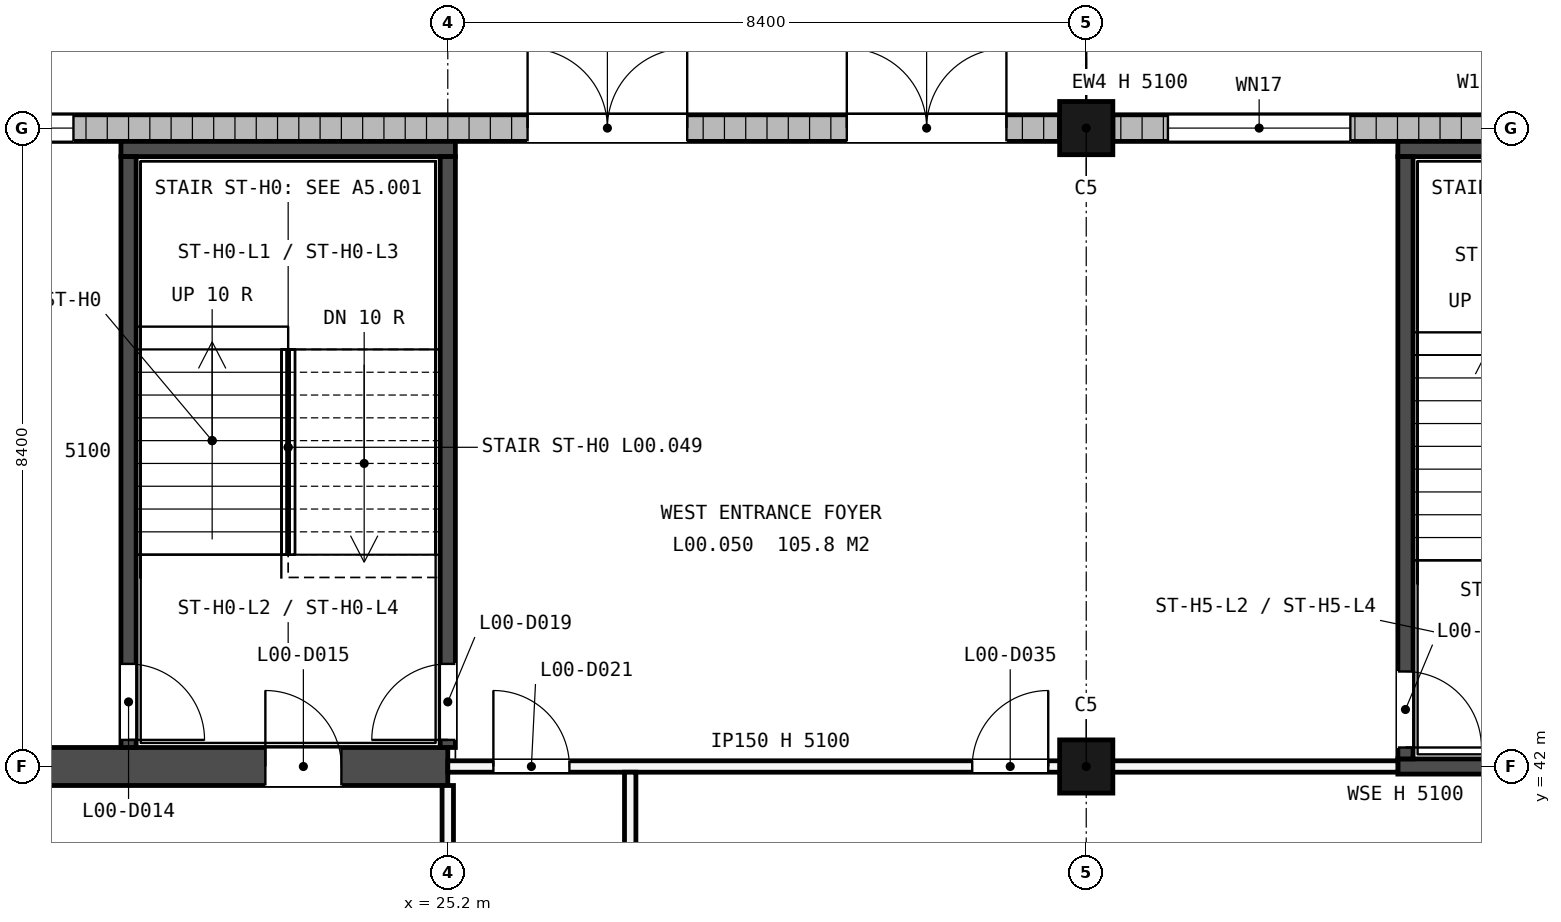
"""IFC4 building model, lengths in metres.
Left out: names, types, materials, properties, quantities, classifications, styles, units other than length and angle.
Written with IfcOpenShell. Run it as: python <this file> out.ifc"""

import sys

from ifc_helpers import new_model, si_unit, direction, frame, frame_2d, origin, origin_2d, place, context, subcontext, project, spatial, rectangle, extrude, element, fill, save


model = new_model("IFC4")
c1 = context("Model", 3, precision=1e-05, world=origin(), true_north=direction((0.0, 1.0)))
c2 = subcontext(c1, "Body", "Model", "MODEL_VIEW")
j1 = project(units=[si_unit("LENGTHUNIT", "METRE"), si_unit("PLANEANGLEUNIT", "RADIAN")], contexts=[c1])
p1 = place(None, origin())
s1 = spatial("IfcSite", under=j1, at=p1, CompositionType="ELEMENT")
p2 = place(p1, origin())
s2 = spatial("IfcBuilding", under=s1, at=p2, CompositionType="ELEMENT")
p3 = place(p2, origin())
s3 = spatial("IfcBuildingStorey", under=s2, at=p3, CompositionType="ELEMENT", Elevation=0.0)
for number, where, z_axis, x_axis in (
    (1, (33.6, 42.0, -0.3), (0.0, 0.0, 1.0), (1.0, 0.0, 0.0)),
    (2, (33.6, 50.4, -0.3), (0.0, 0.0, 1.0), (1.0, 0.0, 0.0)),
):
    element("IfcColumn", number, at=place(p3, frame(where, z_axis=z_axis, x_axis=x_axis)), inside=s3, PredefinedType="COLUMN", context=c2, shape_type="SweptSolid", body=[
        extrude(rectangle(XDim=0.7, YDim=0.7, at=origin_2d()), origin(), (0.0, 0.0, 1.0), 5.4),
    ])
p4 = place(p3, frame((0.0, 42.0, -0.3), z_axis=(0.0, 0.0, 1.0), x_axis=(1.0, 0.0, 0.0)))
e3 = element("IfcWall", 3, at=p4, inside=s3, PredefinedType="SHEAR", context=c2, shape_type="SweptSolid", body=[
    extrude(rectangle(XDim=25.2, YDim=0.5, at=frame_2d((12.6, 0.0))), origin(), (0.0, 0.0, 1.0), 5.4),
])
p5 = place(p4, frame((9.8, 0.0, 0.3)))
e4 = element("IfcOpeningElement", 4, at=p5, cuts=e3, PredefinedType="OPENING", context=c2, shape_type="SweptSolid", body=[
    extrude(rectangle(XDim=1.0, YDim=2.1, at=frame_2d((0.5, 1.05))), frame((0.0, 0.26, 0.0), z_axis=(0.0, -1.0, 0.0), x_axis=(1.0, 0.0, 0.0)), (0.0, 0.0, 1.0), 0.52),
])
p6 = place(p4, frame((22.8, 0.0, 0.3)))
e5 = element("IfcOpeningElement", 5, at=p6, cuts=e3, PredefinedType="OPENING", context=c2, shape_type="SweptSolid", body=[
    extrude(rectangle(XDim=1.0, YDim=2.1, at=frame_2d((0.5, 1.05))), frame((0.0, 0.26, 0.0), z_axis=(0.0, -1.0, 0.0), x_axis=(1.0, 0.0, 0.0)), (0.0, 0.0, 1.0), 0.52),
])
p7 = place(p3, frame((17.15, 50.4, 0.0), z_axis=(0.0, 0.0, 1.0), x_axis=(1.0, 0.0, 0.0)))
e6 = element("IfcWall", 6, at=p7, inside=s3, PredefinedType="STANDARD", context=c2, shape_type="SweptSolid", body=[
    extrude(rectangle(XDim=16.1, YDim=0.35, at=frame_2d((8.05, 0.0))), origin(), (0.0, 0.0, 1.0), 5.1),
])
p8 = place(p7, frame((9.1, 0.0, 0.0)))
e7 = element("IfcOpeningElement", 7, at=p8, cuts=e6, PredefinedType="OPENING", context=c2, shape_type="SweptSolid", body=[
    extrude(rectangle(XDim=2.1, YDim=2.2, at=frame_2d((1.05, 1.1))), frame((0.0, 0.185, 0.0), z_axis=(0.0, -1.0, 0.0), x_axis=(1.0, 0.0, 0.0)), (0.0, 0.0, 1.0), 0.37),
])
p9 = place(p7, frame((13.3, 0.0, 0.0)))
e8 = element("IfcOpeningElement", 8, at=p9, cuts=e6, PredefinedType="OPENING", context=c2, shape_type="SweptSolid", body=[
    extrude(rectangle(XDim=2.1, YDim=2.2, at=frame_2d((1.05, 1.1))), frame((0.0, 0.185, 0.0), z_axis=(0.0, -1.0, 0.0), x_axis=(1.0, 0.0, 0.0)), (0.0, 0.0, 1.0), 0.37),
])
p10 = place(p7, frame((0.725, 0.0, 0.9)))
e9 = element("IfcOpeningElement", 9, at=p10, cuts=e6, PredefinedType="OPENING", context=c2, shape_type="SweptSolid", body=[
    extrude(rectangle(XDim=2.4, YDim=1.5, at=frame_2d((1.2, 0.75))), frame((0.0, 0.185, 0.0), z_axis=(0.0, -1.0, 0.0), x_axis=(1.0, 0.0, 0.0)), (0.0, 0.0, 1.0), 0.37),
])
p11 = place(p3, frame((33.95, 50.4, 0.0), z_axis=(0.0, 0.0, 1.0), x_axis=(1.0, 0.0, 0.0)))
e10 = element("IfcWall", 10, at=p11, inside=s3, PredefinedType="STANDARD", context=c2, shape_type="SweptSolid", body=[
    extrude(rectangle(XDim=8.05, YDim=0.35, at=frame_2d((4.025, 0.0))), origin(), (0.0, 0.0, 1.0), 5.1),
])
p12 = place(p11, frame((0.725, 0.0, 0.9)))
e11 = element("IfcOpeningElement", 11, at=p12, cuts=e10, PredefinedType="OPENING", context=c2, shape_type="SweptSolid", body=[
    extrude(rectangle(XDim=2.4, YDim=1.5, at=frame_2d((1.2, 0.75))), frame((0.0, 0.185, 0.0), z_axis=(0.0, -1.0, 0.0), x_axis=(1.0, 0.0, 0.0)), (0.0, 0.0, 1.0), 0.37),
])
p13 = place(p3, frame((20.9, 50.125, 0.0), z_axis=(0.0, 0.0, 1.0), x_axis=(1.0, 0.0, 0.0)))
e12 = element("IfcWall", 12, at=p13, inside=s3, PredefinedType="SHEAR", context=c2, shape_type="SweptSolid", body=[
    extrude(rectangle(XDim=4.4, YDim=0.2, at=frame_2d((2.2, 0.0))), origin(), (0.0, 0.0, 1.0), 5.1),
])
p14 = place(p3, frame((21.0, 42.25, 0.0), z_axis=(0.0, 0.0, 1.0), x_axis=(0.0, 1.0, 0.0)))
e13 = element("IfcWall", 13, at=p14, inside=s3, PredefinedType="SHEAR", context=c2, shape_type="SweptSolid", body=[
    extrude(rectangle(XDim=7.775, YDim=0.2, at=frame_2d((3.887, 0.0))), origin(), (0.0, 0.0, 1.0), 5.1),
])
p15 = place(p14, frame((0.1, 0.0, 0.0)))
e14 = element("IfcOpeningElement", 14, at=p15, cuts=e13, PredefinedType="OPENING", context=c2, shape_type="SweptSolid", body=[
    extrude(rectangle(XDim=1.0, YDim=2.1, at=frame_2d((0.5, 1.05))), frame((0.0, 0.11, 0.0), z_axis=(0.0, -1.0, 0.0), x_axis=(1.0, 0.0, 0.0)), (0.0, 0.0, 1.0), 0.22),
])
p16 = place(p3, frame((25.2, 42.25, 0.0), z_axis=(0.0, 0.0, 1.0), x_axis=(0.0, 1.0, 0.0)))
e15 = element("IfcWall", 15, at=p16, inside=s3, PredefinedType="SHEAR", context=c2, shape_type="SweptSolid", body=[
    extrude(rectangle(XDim=7.775, YDim=0.2, at=frame_2d((3.887, 0.0))), origin(), (0.0, 0.0, 1.0), 5.1),
])
p17 = place(p16, frame((0.1, 0.0, 0.0)))
e16 = element("IfcOpeningElement", 16, at=p17, cuts=e15, PredefinedType="OPENING", context=c2, shape_type="SweptSolid", body=[
    extrude(rectangle(XDim=1.0, YDim=2.1, at=frame_2d((0.5, 1.05))), frame((0.0, 0.11, 0.0), z_axis=(0.0, -1.0, 0.0), x_axis=(1.0, 0.0, 0.0)), (0.0, 0.0, 1.0), 0.22),
])
p18 = place(p3, frame((37.7, 42.0, 0.0), z_axis=(0.0, 0.0, 1.0), x_axis=(1.0, 0.0, 0.0)))
e17 = element("IfcWall", 17, at=p18, inside=s3, PredefinedType="SHEAR", context=c2, shape_type="SweptSolid", body=[
    extrude(rectangle(XDim=4.4, YDim=0.2, at=frame_2d((2.2, 0.0))), origin(), (0.0, 0.0, 1.0), 5.1),
])
p19 = place(p18, frame((1.5, 0.0, 0.0)))
e18 = element("IfcOpeningElement", 18, at=p19, cuts=e17, PredefinedType="OPENING", context=c2, shape_type="SweptSolid", body=[
    extrude(rectangle(XDim=1.0, YDim=2.1, at=frame_2d((0.5, 1.05))), frame((0.0, 0.11, 0.0), z_axis=(0.0, -1.0, 0.0), x_axis=(1.0, 0.0, 0.0)), (0.0, 0.0, 1.0), 0.22),
])
p20 = place(p3, frame((37.7, 50.125, 0.0), z_axis=(0.0, 0.0, 1.0), x_axis=(1.0, 0.0, 0.0)))
e19 = element("IfcWall", 19, at=p20, inside=s3, PredefinedType="SHEAR", context=c2, shape_type="SweptSolid", body=[
    extrude(rectangle(XDim=4.4, YDim=0.2, at=frame_2d((2.2, 0.0))), origin(), (0.0, 0.0, 1.0), 5.1),
])
p21 = place(p3, frame((37.8, 42.1, 0.0), z_axis=(0.0, 0.0, 1.0), x_axis=(0.0, 1.0, 0.0)))
e20 = element("IfcWall", 20, at=p21, inside=s3, PredefinedType="SHEAR", context=c2, shape_type="SweptSolid", body=[
    extrude(rectangle(XDim=7.925, YDim=0.2, at=frame_2d((3.962, 0.0))), origin(), (0.0, 0.0, 1.0), 5.1),
])
p22 = place(p21, frame((0.15, 0.0, 0.0)))
e21 = element("IfcOpeningElement", 21, at=p22, cuts=e20, PredefinedType="OPENING", context=c2, shape_type="SweptSolid", body=[
    extrude(rectangle(XDim=1.0, YDim=2.1, at=frame_2d((0.5, 1.05))), frame((0.0, 0.11, 0.0), z_axis=(0.0, -1.0, 0.0), x_axis=(1.0, 0.0, 0.0)), (0.0, 0.0, 1.0), 0.22),
])
p23 = place(p3, frame((25.2, 42.0, 0.0), z_axis=(0.0, 0.0, 1.0), x_axis=(1.0, 0.0, 0.0)))
e22 = element("IfcWall", 22, at=p23, inside=s3, PredefinedType="PARTITIONING", context=c2, shape_type="SweptSolid", body=[
    extrude(rectangle(XDim=12.5, YDim=0.15, at=frame_2d((6.25, 0.0))), origin(), (0.0, 0.0, 1.0), 5.1),
])
p24 = place(p23, frame((0.6, 0.0, 0.0)))
e23 = element("IfcOpeningElement", 23, at=p24, cuts=e22, PredefinedType="OPENING", context=c2, shape_type="SweptSolid", body=[
    extrude(rectangle(XDim=1.0, YDim=2.1, at=frame_2d((0.5, 1.05))), frame((0.0, 0.085, 0.0), z_axis=(0.0, -1.0, 0.0), x_axis=(1.0, 0.0, 0.0)), (0.0, 0.0, 1.0), 0.17),
])
p25 = place(p23, frame((6.9, 0.0, 0.0)))
e24 = element("IfcOpeningElement", 24, at=p25, cuts=e22, PredefinedType="OPENING", context=c2, shape_type="SweptSolid", body=[
    extrude(rectangle(XDim=1.0, YDim=2.1, at=frame_2d((0.5, 1.05))), frame((0.0, 0.085, 0.0), z_axis=(0.0, -1.0, 0.0), x_axis=(1.0, 0.0, 0.0)), (0.0, 0.0, 1.0), 0.17),
])
p26 = place(p3, frame((25.2, 37.875, 0.0), z_axis=(0.0, 0.0, 1.0), x_axis=(0.0, 1.0, 0.0)))
e25 = element("IfcWall", 25, at=p26, inside=s3, PredefinedType="PARTITIONING", context=c2, shape_type="SweptSolid", body=[
    extrude(rectangle(XDim=3.875, YDim=0.15, at=frame_2d((1.938, 0.0))), origin(), (0.0, 0.0, 1.0), 5.1),
])
p27 = place(p26, frame((1.325, 0.0, 0.0)))
e26 = element("IfcOpeningElement", 26, at=p27, cuts=e25, PredefinedType="OPENING", context=c2, shape_type="SweptSolid", body=[
    extrude(rectangle(XDim=1.0, YDim=2.1, at=frame_2d((0.5, 1.05))), frame((0.0, 0.085, 0.0), z_axis=(0.0, -1.0, 0.0), x_axis=(1.0, 0.0, 0.0)), (0.0, 0.0, 1.0), 0.17),
])
p28 = place(p3, frame((27.6, 33.5, 0.0), z_axis=(0.0, 0.0, 1.0), x_axis=(0.0, 1.0, 0.0)))
e27 = element("IfcWall", 27, at=p28, inside=s3, PredefinedType="PARTITIONING", context=c2, shape_type="SweptSolid", body=[
    extrude(rectangle(XDim=8.425, YDim=0.15, at=frame_2d((4.212, 0.0))), origin(), (0.0, 0.0, 1.0), 5.1),
])
p29 = place(p28, frame((3.9, 0.0, 0.0)))
e28 = element("IfcOpeningElement", 28, at=p29, cuts=e27, PredefinedType="OPENING", context=c2, shape_type="SweptSolid", body=[
    extrude(rectangle(XDim=1.0, YDim=2.1, at=frame_2d((0.5, 1.05))), frame((0.0, 0.085, 0.0), z_axis=(0.0, -1.0, 0.0), x_axis=(1.0, 0.0, 0.0)), (0.0, 0.0, 1.0), 0.17),
])
p30 = place(p8, origin())
e29 = element("IfcDoor", 29, at=p30, inside=s3, OperationType="SINGLE_SWING_LEFT", PredefinedType="DOOR", context=c2, shape_type="SweptSolid", body=[
    extrude(rectangle(XDim=2.1, YDim=0.013, at=frame_2d((1.05, 0.007))), frame((0.0, 0.115, 0.0), z_axis=(0.0, -1.0, 0.0), x_axis=(1.0, 0.0, 0.0)), (0.0, 0.0, 1.0), 0.23),
    extrude(rectangle(XDim=0.075, YDim=2.112, at=frame_2d((0.038, 1.069))), frame((0.0, 0.125, 0.0), z_axis=(0.0, -1.0, 0.0), x_axis=(1.0, 0.0, 0.0)), (0.0, 0.0, 1.0), 0.25),
    extrude(rectangle(XDim=0.075, YDim=2.112, at=frame_2d((2.062, 1.069))), frame((0.0, 0.125, 0.0), z_axis=(0.0, -1.0, 0.0), x_axis=(1.0, 0.0, 0.0)), (0.0, 0.0, 1.0), 0.25),
    extrude(rectangle(XDim=2.1, YDim=0.075, at=frame_2d((1.05, 2.163))), frame((0.0, 0.115, 0.0), z_axis=(0.0, -1.0, 0.0), x_axis=(1.0, 0.0, 0.0)), (0.0, 0.0, 1.0), 0.23),
    extrude(rectangle(XDim=1.95, YDim=0.3, at=frame_2d((1.05, 0.163))), frame((0.0, 0.02, 0.0), z_axis=(0.0, -1.0, 0.0), x_axis=(1.0, 0.0, 0.0)), (0.0, 0.0, 1.0), 0.04),
    extrude(rectangle(XDim=1.95, YDim=0.12, at=frame_2d((1.05, 2.065))), frame((0.0, 0.02, 0.0), z_axis=(0.0, -1.0, 0.0), x_axis=(1.0, 0.0, 0.0)), (0.0, 0.0, 1.0), 0.04),
    extrude(rectangle(XDim=0.09, YDim=1.692, at=frame_2d((0.12, 1.159))), frame((0.0, 0.025, 0.0), z_axis=(0.0, -1.0, 0.0), x_axis=(1.0, 0.0, 0.0)), (0.0, 0.0, 1.0), 0.05),
    extrude(rectangle(XDim=0.18, YDim=1.692, at=frame_2d((1.05, 1.159))), frame((0.0, 0.025, 0.0), z_axis=(0.0, -1.0, 0.0), x_axis=(1.0, 0.0, 0.0)), (0.0, 0.0, 1.0), 0.05),
    extrude(rectangle(XDim=0.09, YDim=1.692, at=frame_2d((1.98, 1.159))), frame((0.0, 0.025, 0.0), z_axis=(0.0, -1.0, 0.0), x_axis=(1.0, 0.0, 0.0)), (0.0, 0.0, 1.0), 0.05),
    extrude(rectangle(XDim=0.795, YDim=1.692, at=frame_2d((0.562, 1.159))), frame((0.0, 0.012, 0.0), z_axis=(0.0, -1.0, 0.0), x_axis=(1.0, 0.0, 0.0)), (0.0, 0.0, 1.0), 0.024),
    extrude(rectangle(XDim=0.795, YDim=1.692, at=frame_2d((1.538, 1.159))), frame((0.0, 0.012, 0.0), z_axis=(0.0, -1.0, 0.0), x_axis=(1.0, 0.0, 0.0)), (0.0, 0.0, 1.0), 0.024),
])
fill(e7, e29)
p31 = place(p9, origin())
e30 = element("IfcDoor", 30, at=p31, inside=s3, OperationType="SINGLE_SWING_LEFT", PredefinedType="DOOR", context=c2, shape_type="SweptSolid", body=[
    extrude(rectangle(XDim=2.1, YDim=0.013, at=frame_2d((1.05, 0.007))), frame((0.0, 0.115, 0.0), z_axis=(0.0, -1.0, 0.0), x_axis=(1.0, 0.0, 0.0)), (0.0, 0.0, 1.0), 0.23),
    extrude(rectangle(XDim=0.075, YDim=2.112, at=frame_2d((0.038, 1.069))), frame((0.0, 0.125, 0.0), z_axis=(0.0, -1.0, 0.0), x_axis=(1.0, 0.0, 0.0)), (0.0, 0.0, 1.0), 0.25),
    extrude(rectangle(XDim=0.075, YDim=2.112, at=frame_2d((2.062, 1.069))), frame((0.0, 0.125, 0.0), z_axis=(0.0, -1.0, 0.0), x_axis=(1.0, 0.0, 0.0)), (0.0, 0.0, 1.0), 0.25),
    extrude(rectangle(XDim=2.1, YDim=0.075, at=frame_2d((1.05, 2.163))), frame((0.0, 0.115, 0.0), z_axis=(0.0, -1.0, 0.0), x_axis=(1.0, 0.0, 0.0)), (0.0, 0.0, 1.0), 0.23),
    extrude(rectangle(XDim=1.95, YDim=0.3, at=frame_2d((1.05, 0.163))), frame((0.0, 0.02, 0.0), z_axis=(0.0, -1.0, 0.0), x_axis=(1.0, 0.0, 0.0)), (0.0, 0.0, 1.0), 0.04),
    extrude(rectangle(XDim=1.95, YDim=0.12, at=frame_2d((1.05, 2.065))), frame((0.0, 0.02, 0.0), z_axis=(0.0, -1.0, 0.0), x_axis=(1.0, 0.0, 0.0)), (0.0, 0.0, 1.0), 0.04),
    extrude(rectangle(XDim=0.09, YDim=1.692, at=frame_2d((0.12, 1.159))), frame((0.0, 0.025, 0.0), z_axis=(0.0, -1.0, 0.0), x_axis=(1.0, 0.0, 0.0)), (0.0, 0.0, 1.0), 0.05),
    extrude(rectangle(XDim=0.18, YDim=1.692, at=frame_2d((1.05, 1.159))), frame((0.0, 0.025, 0.0), z_axis=(0.0, -1.0, 0.0), x_axis=(1.0, 0.0, 0.0)), (0.0, 0.0, 1.0), 0.05),
    extrude(rectangle(XDim=0.09, YDim=1.692, at=frame_2d((1.98, 1.159))), frame((0.0, 0.025, 0.0), z_axis=(0.0, -1.0, 0.0), x_axis=(1.0, 0.0, 0.0)), (0.0, 0.0, 1.0), 0.05),
    extrude(rectangle(XDim=0.795, YDim=1.692, at=frame_2d((0.562, 1.159))), frame((0.0, 0.012, 0.0), z_axis=(0.0, -1.0, 0.0), x_axis=(1.0, 0.0, 0.0)), (0.0, 0.0, 1.0), 0.024),
    extrude(rectangle(XDim=0.795, YDim=1.692, at=frame_2d((1.538, 1.159))), frame((0.0, 0.012, 0.0), z_axis=(0.0, -1.0, 0.0), x_axis=(1.0, 0.0, 0.0)), (0.0, 0.0, 1.0), 0.024),
])
fill(e8, e30)
p32 = place(p10, origin())
e31 = element("IfcWindow", 31, at=p32, inside=s3, PartitioningType="SINGLE_PANEL", PredefinedType="WINDOW", context=c2, shape_type="SweptSolid", body=[
    extrude(rectangle(XDim=2.4, YDim=1.5, at=frame_2d((1.2, 0.75))), frame((0.0, 0.03, 0.0), z_axis=(0.0, -1.0, 0.0), x_axis=(1.0, 0.0, 0.0)), (0.0, 0.0, 1.0), 0.06),
])
fill(e9, e31)
p33 = place(p12, origin())
e32 = element("IfcWindow", 32, at=p33, inside=s3, PartitioningType="SINGLE_PANEL", PredefinedType="WINDOW", context=c2, shape_type="SweptSolid", body=[
    extrude(rectangle(XDim=2.4, YDim=1.5, at=frame_2d((1.2, 0.75))), frame((0.0, 0.03, 0.0), z_axis=(0.0, -1.0, 0.0), x_axis=(1.0, 0.0, 0.0)), (0.0, 0.0, 1.0), 0.06),
])
fill(e11, e32)
p34 = place(p17, origin())
e33 = element("IfcDoor", 33, at=p34, inside=s3, OperationType="SINGLE_SWING_RIGHT", PredefinedType="DOOR", context=c2, shape_type="SweptSolid", body=[
    extrude(rectangle(XDim=1.0, YDim=2.1, at=frame_2d((0.5, 1.05))), frame((0.0, 0.025, 0.0), z_axis=(0.0, -1.0, 0.0), x_axis=(1.0, 0.0, 0.0)), (0.0, 0.0, 1.0), 0.05),
])
fill(e16, e33)
p35 = place(p15, origin())
e34 = element("IfcDoor", 34, at=p35, inside=s3, OperationType="SINGLE_SWING_LEFT", PredefinedType="DOOR", context=c2, shape_type="SweptSolid", body=[
    extrude(rectangle(XDim=1.0, YDim=2.1, at=frame_2d((0.5, 1.05))), frame((0.0, 0.025, 0.0), z_axis=(0.0, -1.0, 0.0), x_axis=(1.0, 0.0, 0.0)), (0.0, 0.0, 1.0), 0.05),
])
fill(e14, e34)
p36 = place(p22, origin())
e35 = element("IfcDoor", 35, at=p36, inside=s3, OperationType="SINGLE_SWING_LEFT", PredefinedType="DOOR", context=c2, shape_type="SweptSolid", body=[
    extrude(rectangle(XDim=1.0, YDim=2.1, at=frame_2d((0.5, 1.05))), frame((0.0, 0.025, 0.0), z_axis=(0.0, -1.0, 0.0), x_axis=(1.0, 0.0, 0.0)), (0.0, 0.0, 1.0), 0.05),
])
fill(e21, e35)
p37 = place(p6, origin())
e36 = element("IfcDoor", 36, at=p37, inside=s3, OperationType="SINGLE_SWING_RIGHT", PredefinedType="DOOR", context=c2, shape_type="SweptSolid", body=[
    extrude(rectangle(XDim=1.0, YDim=2.1, at=frame_2d((0.5, 1.05))), frame((0.0, 0.025, 0.0), z_axis=(0.0, -1.0, 0.0), x_axis=(1.0, 0.0, 0.0)), (0.0, 0.0, 1.0), 0.05),
])
fill(e5, e36)
p38 = place(p24, origin())
e37 = element("IfcDoor", 37, at=p38, inside=s3, OperationType="SINGLE_SWING_RIGHT", PredefinedType="DOOR", context=c2, shape_type="SweptSolid", body=[
    extrude(rectangle(XDim=1.0, YDim=2.1, at=frame_2d((0.5, 1.05))), frame((0.0, 0.025, 0.0), z_axis=(0.0, -1.0, 0.0), x_axis=(1.0, 0.0, 0.0)), (0.0, 0.0, 1.0), 0.05),
])
fill(e23, e37)
p39 = place(p25, origin())
e38 = element("IfcDoor", 38, at=p39, inside=s3, OperationType="SINGLE_SWING_LEFT", PredefinedType="DOOR", context=c2, shape_type="SweptSolid", body=[
    extrude(rectangle(XDim=1.0, YDim=2.1, at=frame_2d((0.5, 1.05))), frame((0.0, 0.025, 0.0), z_axis=(0.0, -1.0, 0.0), x_axis=(1.0, 0.0, 0.0)), (0.0, 0.0, 1.0), 0.05),
])
fill(e24, e38)
save(model, sys.argv[1])
